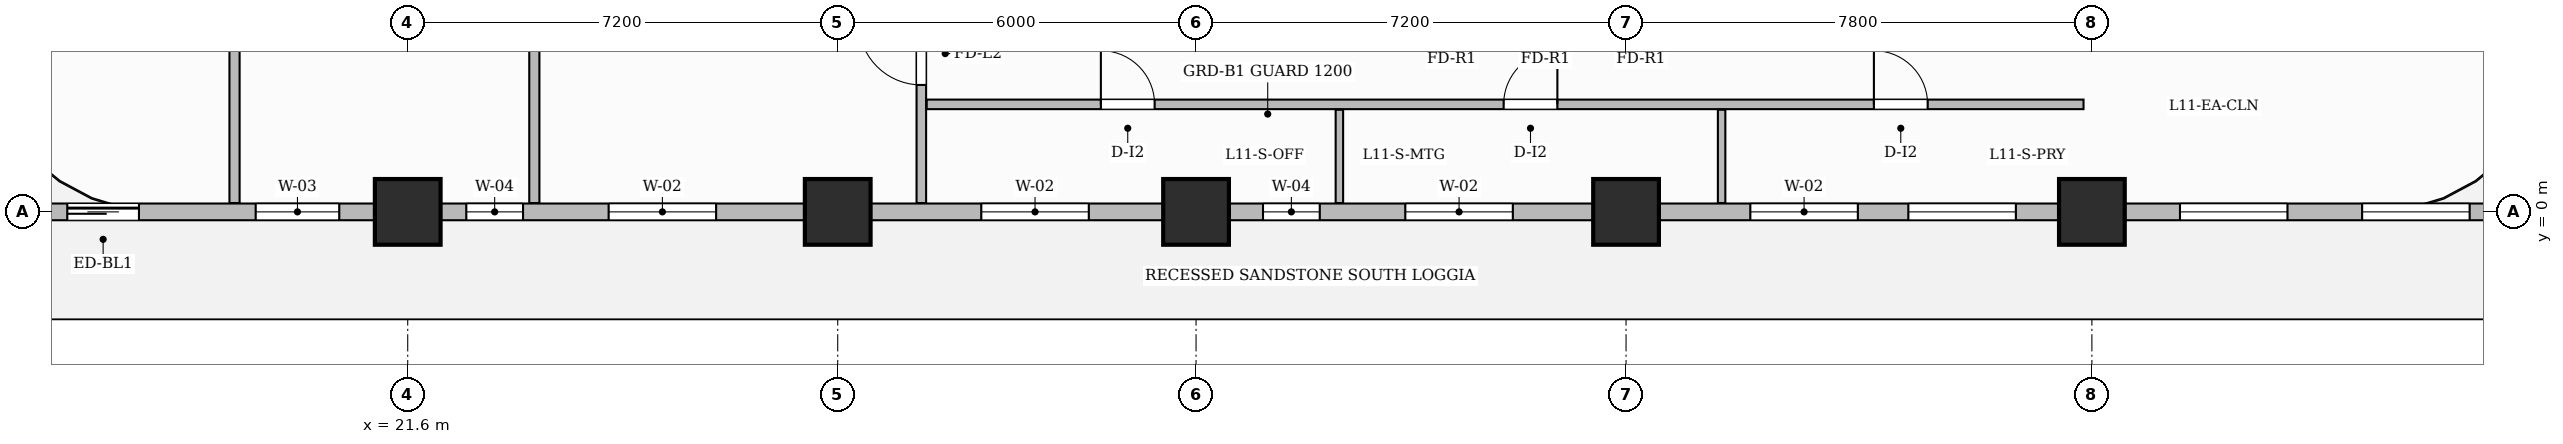
"""IFC4 building model, lengths in metres.
Left out: names, types, materials, properties, quantities, classifications, styles, units other than length and angle.
Written with IfcOpenShell. Run it as: python <this file> out.ifc"""

import sys

from ifc_helpers import new_model, si_unit, direction, frame, frame_2d, origin, origin_2d, place, context, subcontext, project, spatial, rectangle, extrude, source, transform, mapped, element, fill, save


model = new_model("IFC4")
c1 = context("Model", 3, precision=1e-05, world=origin(), true_north=direction((0.0, 1.0)))
c2 = subcontext(c1, "Body", "Model", "MODEL_VIEW")
j1 = project(units=[si_unit("LENGTHUNIT", "METRE"), si_unit("PLANEANGLEUNIT", "RADIAN")], contexts=[c1])
p1 = place(None, origin())
s1 = spatial("IfcSite", under=j1, at=p1, CompositionType="ELEMENT")
p2 = place(p1, origin())
s2 = spatial("IfcBuilding", under=s1, at=p2, CompositionType="ELEMENT")
p3 = place(p2, frame((0.0, 0.0, 50.9)))
s3 = spatial("IfcBuildingStorey", under=s2, at=p3, CompositionType="ELEMENT", Elevation=50.9)
m1 = source(origin(), c2, "Body", "SweptSolid", [
    extrude(rectangle(XDim=1.1, YDim=1.1, at=origin_2d()), origin(), (0.0, 0.0, 1.0), 3.7),
])
for number, where, z_axis, x_axis in (
    (1, (21.6, 0.0, 0.0), (0.0, 0.0, 1.0), (1.0, 0.0, 0.0)),
    (2, (28.8, 0.0, 0.0), (0.0, 0.0, 1.0), (1.0, 0.0, 0.0)),
    (3, (34.8, 0.0, 0.0), (0.0, 0.0, 1.0), (1.0, 0.0, 0.0)),
    (4, (42.0, 0.0, 0.0), (0.0, 0.0, 1.0), (1.0, 0.0, 0.0)),
    (5, (49.8, 0.0, 0.0), (0.0, 0.0, 1.0), (1.0, 0.0, 0.0)),
):
    element("IfcColumn", number, at=place(p3, frame(where, z_axis=z_axis, x_axis=x_axis)), inside=s3, PredefinedType="COLUMN", context=c2, shape_type="MappedRepresentation", body=[
        mapped(m1, transform((0.0, 0.0, 0.0), scale=1.0)),
    ])
p4 = place(p3, frame((30.2, 0.148, 0.0), z_axis=(0.0, 0.0, 1.0), x_axis=(0.0, 1.0, 0.0)))
e6 = element("IfcWall", 6, at=p4, inside=s3, PredefinedType="PARTITIONING", context=c2, shape_type="SweptSolid", body=[
    extrude(rectangle(XDim=10.112, YDim=0.16, at=frame_2d((5.056, 0.0))), origin(), (0.0, 0.0, 1.0), 3.45),
])
p5 = place(p4, frame((1.977, 0.0, 0.0)))
e7 = element("IfcOpeningElement", 7, at=p5, cuts=e6, PredefinedType="OPENING", context=c2, shape_type="SweptSolid", body=[
    extrude(rectangle(XDim=1.05, YDim=2.15, at=frame_2d((0.525, 1.075))), frame((0.0, 0.09, 0.0), z_axis=(0.0, -1.0, 0.0), x_axis=(1.0, 0.0, 0.0)), (0.0, 0.0, 1.0), 0.18),
])
p6 = place(p3, frame((30.29, 1.8, 0.0), z_axis=(0.0, 0.0, 1.0), x_axis=(1.0, 0.0, 0.0)))
e8 = element("IfcWall", 8, at=p6, inside=s3, PredefinedType="PARTITIONING", context=c2, shape_type="SweptSolid", body=[
    extrude(rectangle(XDim=19.37, YDim=0.16, at=frame_2d((9.685, 0.0))), origin(), (0.0, 0.0, 1.0), 3.45),
])
p7 = place(p6, frame((2.916, 0.0, 0.0)))
e9 = element("IfcOpeningElement", 9, at=p7, cuts=e8, PredefinedType="OPENING", context=c2, shape_type="SweptSolid", body=[
    extrude(rectangle(XDim=0.9, YDim=2.15, at=frame_2d((0.45, 1.075))), frame((0.0, 0.09, 0.0), z_axis=(0.0, -1.0, 0.0), x_axis=(1.0, 0.0, 0.0)), (0.0, 0.0, 1.0), 0.18),
])
p8 = place(p6, frame((9.66, 0.0, 0.0)))
e10 = element("IfcOpeningElement", 10, at=p8, cuts=e8, PredefinedType="OPENING", context=c2, shape_type="SweptSolid", body=[
    extrude(rectangle(XDim=0.9, YDim=2.15, at=frame_2d((0.45, 1.075))), frame((0.0, 0.09, 0.0), z_axis=(0.0, -1.0, 0.0), x_axis=(1.0, 0.0, 0.0)), (0.0, 0.0, 1.0), 0.18),
])
p9 = place(p6, frame((15.86, 0.0, 0.0)))
e11 = element("IfcOpeningElement", 11, at=p9, cuts=e8, PredefinedType="OPENING", context=c2, shape_type="SweptSolid", body=[
    extrude(rectangle(XDim=0.9, YDim=2.15, at=frame_2d((0.45, 1.075))), frame((0.0, 0.09, 0.0), z_axis=(0.0, -1.0, 0.0), x_axis=(1.0, 0.0, 0.0)), (0.0, 0.0, 1.0), 0.18),
])
for number, where, z_axis, x_axis in (
    (12, (37.2, 0.148, 0.0), (0.0, 0.0, 1.0), (0.0, 1.0, 0.0)),
    (13, (43.6, 0.148, 0.0), (0.0, 0.0, 1.0), (0.0, 1.0, 0.0)),
):
    element("IfcWall", number, at=place(p3, frame(where, z_axis=z_axis, x_axis=x_axis)), inside=s3, PredefinedType="PARTITIONING", context=c2, shape_type="SweptSolid", body=[
        extrude(rectangle(XDim=1.562, YDim=0.125, at=frame_2d((0.781, 0.0))), origin(), (0.0, 0.0, 1.0), 3.45),
    ])
for number, where, z_axis, x_axis in (
    (14, (18.7, 0.148, 0.0), (0.0, 0.0, 1.0), (0.0, 1.0, 0.0)),
    (15, (23.72, 0.148, 0.0), (0.0, 0.0, 1.0), (0.0, 1.0, 0.0)),
):
    element("IfcWall", number, at=place(p3, frame(where, z_axis=z_axis, x_axis=x_axis)), inside=s3, PredefinedType="PARTITIONING", context=c2, shape_type="SweptSolid", body=[
        extrude(rectangle(XDim=10.112, YDim=0.17, at=frame_2d((5.056, 0.0))), origin(), (0.0, 0.0, 1.0), 3.45),
    ])
p10 = place(p3, frame((14.4, 0.0, 0.0), z_axis=(0.0, 0.0, 1.0), x_axis=(1.0, 0.0, 0.0)))
e16 = element("IfcWall", 16, at=p10, inside=s3, PredefinedType="SOLIDWALL", context=c2, shape_type="SweptSolid", body=[
    extrude(rectangle(XDim=43.2, YDim=0.28, at=frame_2d((21.6, 0.0))), origin(), (0.0, 0.0, 1.0), 2.885),
])
p11 = place(p10, frame((1.5, 0.0, 0.0)))
e17 = element("IfcOpeningElement", 17, at=p11, cuts=e16, PredefinedType="OPENING", context=c2, shape_type="SweptSolid", body=[
    extrude(rectangle(XDim=1.2, YDim=2.2, at=frame_2d((0.6, 1.1))), frame((0.0, 0.15, 0.0), z_axis=(0.0, -1.0, 0.0), x_axis=(1.0, 0.0, 0.0)), (0.0, 0.0, 1.0), 0.3),
])
p12 = place(p10, frame((4.654, 0.0, 0.8)))
e18 = element("IfcOpeningElement", 18, at=p12, cuts=e16, PredefinedType="OPENING", context=c2, shape_type="SweptSolid", body=[
    extrude(rectangle(XDim=1.4, YDim=1.85, at=frame_2d((0.7, 0.925))), frame((0.0, 0.15, 0.0), z_axis=(0.0, -1.0, 0.0), x_axis=(1.0, 0.0, 0.0)), (0.0, 0.0, 1.0), 0.3),
])
p13 = place(p10, frame((8.181, 0.0, 0.8)))
e19 = element("IfcOpeningElement", 19, at=p13, cuts=e16, PredefinedType="OPENING", context=c2, shape_type="SweptSolid", body=[
    extrude(rectangle(XDim=0.95, YDim=1.75, at=frame_2d((0.475, 0.875))), frame((0.0, 0.15, 0.0), z_axis=(0.0, -1.0, 0.0), x_axis=(1.0, 0.0, 0.0)), (0.0, 0.0, 1.0), 0.3),
])
p14 = place(p10, frame((10.564, 0.0, 0.8)))
e20 = element("IfcOpeningElement", 20, at=p14, cuts=e16, PredefinedType="OPENING", context=c2, shape_type="SweptSolid", body=[
    extrude(rectangle(XDim=1.8, YDim=1.85, at=frame_2d((0.9, 0.925))), frame((0.0, 0.15, 0.0), z_axis=(0.0, -1.0, 0.0), x_axis=(1.0, 0.0, 0.0)), (0.0, 0.0, 1.0), 0.3),
])
p15 = place(p10, frame((16.804, 0.0, 0.8)))
e21 = element("IfcOpeningElement", 21, at=p15, cuts=e16, PredefinedType="OPENING", context=c2, shape_type="SweptSolid", body=[
    extrude(rectangle(XDim=1.8, YDim=1.85, at=frame_2d((0.9, 0.925))), frame((0.0, 0.15, 0.0), z_axis=(0.0, -1.0, 0.0), x_axis=(1.0, 0.0, 0.0)), (0.0, 0.0, 1.0), 0.3),
])
p16 = place(p10, frame((21.521, 0.0, 0.8)))
e22 = element("IfcOpeningElement", 22, at=p16, cuts=e16, PredefinedType="OPENING", context=c2, shape_type="SweptSolid", body=[
    extrude(rectangle(XDim=0.95, YDim=1.75, at=frame_2d((0.475, 0.875))), frame((0.0, 0.15, 0.0), z_axis=(0.0, -1.0, 0.0), x_axis=(1.0, 0.0, 0.0)), (0.0, 0.0, 1.0), 0.3),
])
p17 = place(p10, frame((23.904, 0.0, 0.8)))
e23 = element("IfcOpeningElement", 23, at=p17, cuts=e16, PredefinedType="OPENING", context=c2, shape_type="SweptSolid", body=[
    extrude(rectangle(XDim=1.8, YDim=1.85, at=frame_2d((0.9, 0.925))), frame((0.0, 0.15, 0.0), z_axis=(0.0, -1.0, 0.0), x_axis=(1.0, 0.0, 0.0)), (0.0, 0.0, 1.0), 0.3),
])
p18 = place(p10, frame((29.681, 0.0, 0.8)))
e24 = element("IfcOpeningElement", 24, at=p18, cuts=e16, PredefinedType="OPENING", context=c2, shape_type="SweptSolid", body=[
    extrude(rectangle(XDim=1.8, YDim=1.85, at=frame_2d((0.9, 0.925))), frame((0.0, 0.15, 0.0), z_axis=(0.0, -1.0, 0.0), x_axis=(1.0, 0.0, 0.0)), (0.0, 0.0, 1.0), 0.3),
])
p19 = place(p10, frame((32.327, 0.0, 0.8)))
e25 = element("IfcOpeningElement", 25, at=p19, cuts=e16, PredefinedType="OPENING", context=c2, shape_type="SweptSolid", body=[
    extrude(rectangle(XDim=1.8, YDim=1.85, at=frame_2d((0.9, 0.925))), frame((0.0, 0.15, 0.0), z_axis=(0.0, -1.0, 0.0), x_axis=(1.0, 0.0, 0.0)), (0.0, 0.0, 1.0), 0.3),
])
p20 = place(p10, frame((36.875, 0.0, 0.8)))
e26 = element("IfcOpeningElement", 26, at=p20, cuts=e16, PredefinedType="OPENING", context=c2, shape_type="SweptSolid", body=[
    extrude(rectangle(XDim=1.8, YDim=1.85, at=frame_2d((0.9, 0.925))), frame((0.0, 0.15, 0.0), z_axis=(0.0, -1.0, 0.0), x_axis=(1.0, 0.0, 0.0)), (0.0, 0.0, 1.0), 0.3),
])
p21 = place(p10, frame((39.925, 0.0, 0.8)))
e27 = element("IfcOpeningElement", 27, at=p21, cuts=e16, PredefinedType="OPENING", context=c2, shape_type="SweptSolid", body=[
    extrude(rectangle(XDim=1.8, YDim=1.85, at=frame_2d((0.9, 0.925))), frame((0.0, 0.15, 0.0), z_axis=(0.0, -1.0, 0.0), x_axis=(1.0, 0.0, 0.0)), (0.0, 0.0, 1.0), 0.3),
])
m2 = source(origin(), c2, "Body", "SweptSolid", [
    extrude(rectangle(XDim=1.05, YDim=2.15, at=frame_2d((0.525, 1.075))), frame((0.0, 0.025, 0.0), z_axis=(0.0, -1.0, 0.0), x_axis=(1.0, 0.0, 0.0)), (0.0, 0.0, 1.0), 0.05),
])
p22 = place(p5, origin())
e28 = element("IfcDoor", 28, at=p22, inside=s3, OperationType="SINGLE_SWING_RIGHT", PredefinedType="DOOR", context=c2, shape_type="MappedRepresentation", body=[
    mapped(m2, transform((0.0, 0.0, 0.0), scale=1.0)),
])
fill(e7, e28)
m3 = source(origin(), c2, "Body", "SweptSolid", [
    extrude(rectangle(XDim=0.9, YDim=2.15, at=frame_2d((0.45, 1.075))), frame((0.0, 0.025, 0.0), z_axis=(0.0, -1.0, 0.0), x_axis=(1.0, 0.0, 0.0)), (0.0, 0.0, 1.0), 0.05),
])
p23 = place(p7, origin())
e29 = element("IfcDoor", 29, at=p23, inside=s3, OperationType="SINGLE_SWING_LEFT", PredefinedType="DOOR", context=c2, shape_type="MappedRepresentation", body=[
    mapped(m3, transform((0.0, 0.0, 0.0), scale=1.0)),
])
fill(e9, e29)
p24 = place(p8, origin())
e30 = element("IfcDoor", 30, at=p24, inside=s3, OperationType="SINGLE_SWING_RIGHT", PredefinedType="DOOR", context=c2, shape_type="MappedRepresentation", body=[
    mapped(m3, transform((0.0, 0.0, 0.0), scale=1.0)),
])
fill(e10, e30)
p25 = place(p9, origin())
e31 = element("IfcDoor", 31, at=p25, inside=s3, OperationType="SINGLE_SWING_LEFT", PredefinedType="DOOR", context=c2, shape_type="MappedRepresentation", body=[
    mapped(m3, transform((0.0, 0.0, 0.0), scale=1.0)),
])
fill(e11, e31)
m4 = source(origin(), c2, "Body", "SweptSolid", [
    extrude(rectangle(XDim=1.2, YDim=2.2, at=frame_2d((0.6, 1.1))), frame((0.0, 0.025, 0.0), z_axis=(0.0, -1.0, 0.0), x_axis=(1.0, 0.0, 0.0)), (0.0, 0.0, 1.0), 0.05),
])
p26 = place(p11, origin())
e32 = element("IfcDoor", 32, at=p26, inside=s3, OperationType="SLIDING_TO_LEFT", PredefinedType="DOOR", context=c2, shape_type="MappedRepresentation", body=[
    mapped(m4, transform((0.0, 0.0, 0.0), scale=1.0)),
])
fill(e17, e32)
m5 = source(origin(), c2, "Body", "SweptSolid", [
    extrude(rectangle(XDim=1.4, YDim=1.85, at=frame_2d((0.7, 0.925))), frame((0.0, 0.03, 0.0), z_axis=(0.0, -1.0, 0.0), x_axis=(1.0, 0.0, 0.0)), (0.0, 0.0, 1.0), 0.06),
])
p27 = place(p12, origin())
e33 = element("IfcWindow", 33, at=p27, inside=s3, PartitioningType="SINGLE_PANEL", PredefinedType="WINDOW", context=c2, shape_type="MappedRepresentation", body=[
    mapped(m5, transform((0.0, 0.0, 0.0), scale=1.0)),
])
fill(e18, e33)
m6 = source(origin(), c2, "Body", "SweptSolid", [
    extrude(rectangle(XDim=0.95, YDim=1.75, at=frame_2d((0.475, 0.875))), frame((0.0, 0.03, 0.0), z_axis=(0.0, -1.0, 0.0), x_axis=(1.0, 0.0, 0.0)), (0.0, 0.0, 1.0), 0.06),
])
p28 = place(p13, origin())
e34 = element("IfcWindow", 34, at=p28, inside=s3, PartitioningType="SINGLE_PANEL", PredefinedType="WINDOW", context=c2, shape_type="MappedRepresentation", body=[
    mapped(m6, transform((0.0, 0.0, 0.0), scale=1.0)),
])
fill(e19, e34)
m7 = source(origin(), c2, "Body", "SweptSolid", [
    extrude(rectangle(XDim=1.8, YDim=1.85, at=frame_2d((0.9, 0.925))), frame((0.0, 0.03, 0.0), z_axis=(0.0, -1.0, 0.0), x_axis=(1.0, 0.0, 0.0)), (0.0, 0.0, 1.0), 0.06),
])
p29 = place(p14, origin())
e35 = element("IfcWindow", 35, at=p29, inside=s3, PartitioningType="DOUBLE_PANEL_VERTICAL", PredefinedType="WINDOW", context=c2, shape_type="MappedRepresentation", body=[
    mapped(m7, transform((0.0, 0.0, 0.0), scale=1.0)),
])
fill(e20, e35)
p30 = place(p15, origin())
e36 = element("IfcWindow", 36, at=p30, inside=s3, PartitioningType="DOUBLE_PANEL_VERTICAL", PredefinedType="WINDOW", context=c2, shape_type="MappedRepresentation", body=[
    mapped(m7, transform((0.0, 0.0, 0.0), scale=1.0)),
])
fill(e21, e36)
p31 = place(p16, origin())
e37 = element("IfcWindow", 37, at=p31, inside=s3, PartitioningType="SINGLE_PANEL", PredefinedType="WINDOW", context=c2, shape_type="MappedRepresentation", body=[
    mapped(m6, transform((0.0, 0.0, 0.0), scale=1.0)),
])
fill(e22, e37)
p32 = place(p17, origin())
e38 = element("IfcWindow", 38, at=p32, inside=s3, PartitioningType="DOUBLE_PANEL_VERTICAL", PredefinedType="WINDOW", context=c2, shape_type="MappedRepresentation", body=[
    mapped(m7, transform((0.0, 0.0, 0.0), scale=1.0)),
])
fill(e23, e38)
p33 = place(p18, origin())
e39 = element("IfcWindow", 39, at=p33, inside=s3, PartitioningType="DOUBLE_PANEL_VERTICAL", PredefinedType="WINDOW", context=c2, shape_type="MappedRepresentation", body=[
    mapped(m7, transform((0.0, 0.0, 0.0), scale=1.0)),
])
fill(e24, e39)
p34 = place(p19, origin())
e40 = element("IfcWindow", 40, at=p34, inside=s3, PartitioningType="DOUBLE_PANEL_VERTICAL", PredefinedType="WINDOW", context=c2, shape_type="MappedRepresentation", body=[
    mapped(m7, transform((0.0, 0.0, 0.0), scale=1.0)),
])
fill(e25, e40)
p35 = place(p20, origin())
e41 = element("IfcWindow", 41, at=p35, inside=s3, PartitioningType="DOUBLE_PANEL_VERTICAL", PredefinedType="WINDOW", context=c2, shape_type="MappedRepresentation", body=[
    mapped(m7, transform((0.0, 0.0, 0.0), scale=1.0)),
])
fill(e26, e41)
p36 = place(p21, origin())
e42 = element("IfcWindow", 42, at=p36, inside=s3, PartitioningType="DOUBLE_PANEL_VERTICAL", PredefinedType="WINDOW", context=c2, shape_type="MappedRepresentation", body=[
    mapped(m7, transform((0.0, 0.0, 0.0), scale=1.0)),
])
fill(e27, e42)
save(model, sys.argv[1])
